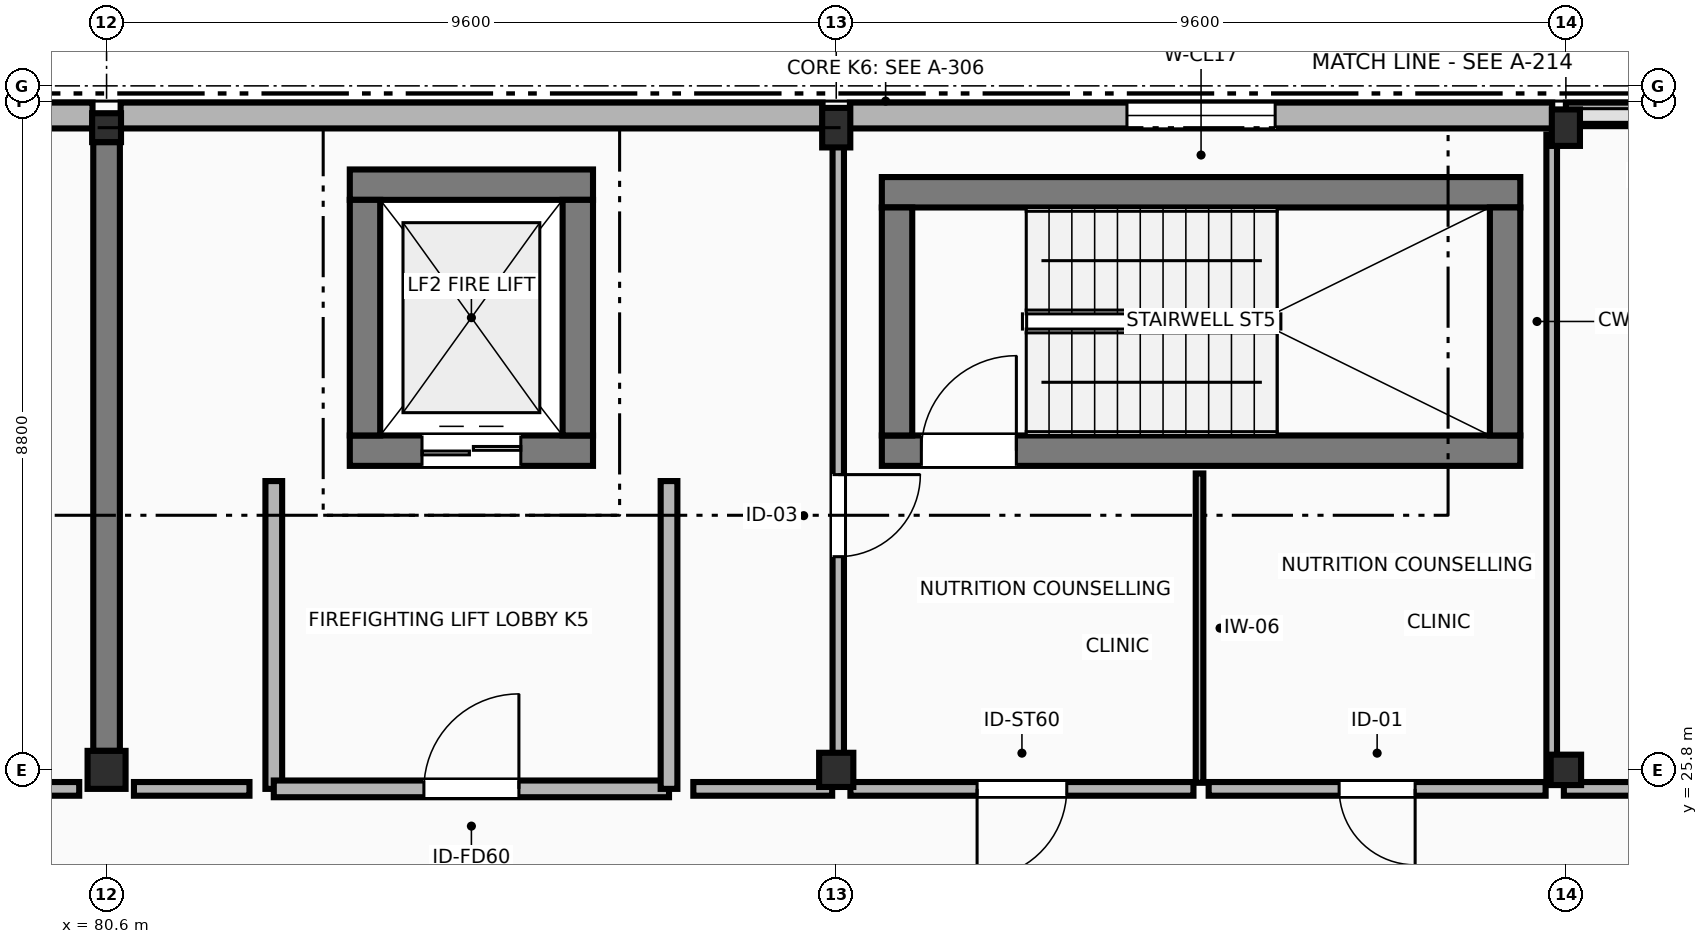
"""IFC4 building model, lengths in metres.
Left out: names, types, materials, properties, quantities, classifications, styles, units other than length and angle.
Written with IfcOpenShell. Run it as: python <this file> out.ifc"""

import sys

from ifc_helpers import new_model, si_unit, direction, frame, frame_2d, origin, origin_2d, place, context, subcontext, project, spatial, polyline, rectangle, outline, extrude, element, fill, save


model = new_model("IFC4")
c1 = context("Model", 3, precision=1e-05, world=origin(), true_north=direction((0.0, 1.0)))
c2 = subcontext(c1, "Body", "Model", "MODEL_VIEW")
j1 = project(units=[si_unit("LENGTHUNIT", "METRE"), si_unit("PLANEANGLEUNIT", "RADIAN")], contexts=[c1])
p1 = place(None, origin())
s1 = spatial("IfcSite", under=j1, at=p1, CompositionType="ELEMENT")
p2 = place(p1, origin())
s2 = spatial("IfcBuilding", under=s1, at=p2, CompositionType="ELEMENT")
p3 = place(p2, frame((0.0, 0.0, 18.0)))
s3 = spatial("IfcBuildingStorey", under=s2, at=p3, CompositionType="ELEMENT", Elevation=18.0)
p4 = place(p3, frame((80.6, 25.8, 0.0), z_axis=(0.0, 0.0, 1.0), x_axis=(1.0, 0.0, 0.0)))
e1 = element("IfcColumn", 1, at=p4, inside=s3, PredefinedType="COLUMN", context=c2, shape_type="SweptSolid", body=[
    extrude(rectangle(XDim=0.5, YDim=0.5, at=origin_2d()), origin(), (0.0, 0.0, 1.0), 4.2),
])
p5 = place(p3, frame((80.6, 34.25, 0.0), z_axis=(0.0, 0.0, 1.0), x_axis=(1.0, 0.0, 0.0)))
e2 = element("IfcColumn", 2, at=p5, inside=s3, PredefinedType="COLUMN", context=c2, shape_type="SweptSolid", body=[
    extrude(rectangle(XDim=0.38, YDim=0.38, at=origin_2d()), origin(), (0.0, 0.0, 1.0), 4.2),
])
p6 = place(p3, frame((90.2, 25.8, 0.0), z_axis=(0.0, 0.0, 1.0), x_axis=(1.0, 0.0, 0.0)))
e3 = element("IfcColumn", 3, at=p6, inside=s3, PredefinedType="COLUMN", context=c2, shape_type="SweptSolid", body=[
    extrude(rectangle(XDim=0.45, YDim=0.45, at=origin_2d()), origin(), (0.0, 0.0, 1.0), 4.2),
])
p7 = place(p3, frame((90.2, 34.25, 0.0), z_axis=(0.0, 0.0, 1.0), x_axis=(1.0, 0.0, 0.0)))
e4 = element("IfcColumn", 4, at=p7, inside=s3, PredefinedType="COLUMN", context=c2, shape_type="SweptSolid", body=[
    extrude(rectangle(XDim=0.37, YDim=0.52, at=origin_2d()), origin(), (0.0, 0.0, 1.0), 4.2),
])
p8 = place(p3, frame((99.8, 25.8, 0.0), z_axis=(0.0, 0.0, 1.0), x_axis=(1.0, 0.0, 0.0)))
e5 = element("IfcColumn", 5, at=p8, inside=s3, PredefinedType="COLUMN", context=c2, shape_type="SweptSolid", body=[
    extrude(rectangle(XDim=0.4, YDim=0.4, at=origin_2d()), origin(), (0.0, 0.0, 1.0), 4.2),
])
p9 = place(p3, frame((99.8, 34.25, 0.0), z_axis=(0.0, 0.0, 1.0), x_axis=(1.0, 0.0, 0.0)))
e6 = element("IfcColumn", 6, at=p9, inside=s3, PredefinedType="COLUMN", context=c2, shape_type="SweptSolid", body=[
    extrude(rectangle(XDim=0.37, YDim=0.48, at=origin_2d()), origin(), (0.0, 0.0, 1.0), 4.2),
])
p10 = place(p3, frame((99.62, 34.41, 0.0), z_axis=(0.0, 0.0, 1.0), x_axis=(-1.0, 0.0, 0.0)))
e7 = element("IfcWall", 7, at=p10, inside=s3, PredefinedType="STANDARD", context=c2, shape_type="SweptSolid", body=[
    extrude(rectangle(XDim=9.24, YDim=0.34, at=frame_2d((4.62, 0.0))), origin(), (0.0, 0.0, 1.0), 3.205),
])
p11 = place(p10, frame((3.645, 0.0, 0.95)))
e8 = element("IfcOpeningElement", 8, at=p11, cuts=e7, PredefinedType="OPENING", context=c2, shape_type="SweptSolid", body=[
    extrude(rectangle(XDim=1.95, YDim=1.55, at=frame_2d((0.975, 0.775))), frame((0.0, 0.18, 0.0), z_axis=(0.0, -1.0, 0.0), x_axis=(1.0, 0.0, 0.0)), (0.0, 0.0, 1.0), 0.36),
])
p12 = place(p3, frame((90.02, 34.41, 0.0), z_axis=(0.0, 0.0, 1.0), x_axis=(-1.0, 0.0, 0.0)))
e9 = element("IfcWall", 9, at=p12, inside=s3, PredefinedType="STANDARD", context=c2, shape_type="SweptSolid", body=[
    extrude(rectangle(XDim=9.235, YDim=0.34, at=frame_2d((4.618, 0.0))), origin(), (0.0, 0.0, 1.0), 3.205),
])
p13 = place(p3, frame((80.415, 34.41, 0.0), z_axis=(0.0, 0.0, 1.0), x_axis=(-1.0, 0.0, 0.0)))
e10 = element("IfcWall", 10, at=p13, inside=s3, PredefinedType="STANDARD", context=c2, shape_type="SweptSolid", body=[
    extrude(rectangle(XDim=9.205, YDim=0.34, at=frame_2d((4.603, 0.0))), origin(), (0.0, 0.0, 1.0), 3.205),
])
p14 = place(p3, frame((109.4, 34.425, 4.2), z_axis=(0.0, 0.0, 1.0), x_axis=(-1.0, 0.0, 0.0)))
e11 = element("IfcWall", 11, at=p14, inside=s3, PredefinedType="STANDARD", context=c2, shape_type="SweptSolid", body=[
    extrude(outline(polyline([(0.0, 0.0), (9.6, 0.0), (9.6, 0.0), (4.8, 8.19), (0.0, 0.0), (0.0, 0.0)])), frame((0.0, 0.155, 0.0), z_axis=(0.0, -1.0, 0.0), x_axis=(1.0, 0.0, 0.0)), (0.0, 0.0, 1.0), 0.31),
])
p15 = place(p14, frame((2.572, 0.0, 0.75)))
e12 = element("IfcOpeningElement", 12, at=p15, cuts=e11, PredefinedType="OPENING", context=c2, shape_type="SweptSolid", body=[
    extrude(rectangle(XDim=1.0, YDim=1.0, at=frame_2d((0.5, 0.5))), frame((0.0, 0.165, 0.0), z_axis=(0.0, -1.0, 0.0), x_axis=(1.0, 0.0, 0.0)), (0.0, 0.0, 1.0), 0.33),
])
p16 = place(p14, frame((5.836, 0.0, 1.55)))
e13 = element("IfcOpeningElement", 13, at=p16, cuts=e11, PredefinedType="OPENING", context=c2, shape_type="SweptSolid", body=[
    extrude(rectangle(XDim=1.0, YDim=1.0, at=frame_2d((0.5, 0.5))), frame((0.0, 0.165, 0.0), z_axis=(0.0, -1.0, 0.0), x_axis=(1.0, 0.0, 0.0)), (0.0, 0.0, 1.0), 0.33),
])
p17 = place(p14, frame((4.3, 0.0, 3.35)))
e14 = element("IfcOpeningElement", 14, at=p17, cuts=e11, PredefinedType="OPENING", context=c2, shape_type="SweptSolid", body=[
    extrude(rectangle(XDim=1.0, YDim=1.0, at=frame_2d((0.5, 0.5))), frame((0.0, 0.165, 0.0), z_axis=(0.0, -1.0, 0.0), x_axis=(1.0, 0.0, 0.0)), (0.0, 0.0, 1.0), 0.33),
])
p18 = place(p3, frame((90.8, 30.0, 0.0), z_axis=(0.0, 0.0, 1.0), x_axis=(1.0, 0.0, 0.0)))
e15 = element("IfcWall", 15, at=p18, inside=s3, PredefinedType="SHEAR", context=c2, shape_type="SweptSolid", body=[
    extrude(rectangle(XDim=8.4, YDim=0.4, at=frame_2d((4.2, 0.0))), origin(), (0.0, 0.0, 1.0), 3.94),
])
p19 = place(p18, frame((0.52, 0.0, 0.0)))
e16 = element("IfcOpeningElement", 16, at=p19, cuts=e15, PredefinedType="OPENING", context=c2, shape_type="SweptSolid", body=[
    extrude(rectangle(XDim=1.25, YDim=2.2, at=frame_2d((0.625, 1.1))), frame((0.0, 0.21, 0.0), z_axis=(0.0, -1.0, 0.0), x_axis=(1.0, 0.0, 0.0)), (0.0, 0.0, 1.0), 0.42),
])
p20 = place(p3, frame((99.2, 33.4, 0.0), z_axis=(0.0, 0.0, 1.0), x_axis=(-1.0, 0.0, 0.0)))
e17 = element("IfcWall", 17, at=p20, inside=s3, PredefinedType="SHEAR", context=c2, shape_type="SweptSolid", body=[
    extrude(rectangle(XDim=8.4, YDim=0.4, at=frame_2d((4.2, 0.0))), origin(), (0.0, 0.0, 1.0), 3.94),
])
for number, where, z_axis, x_axis in (
    (18, (91.0, 30.2, 0.0), (0.0, 0.0, 1.0), (0.0, 1.0, 0.0)),
    (19, (99.0, 33.2, 0.0), (0.0, 0.0, 1.0), (0.0, -1.0, 0.0)),
):
    element("IfcWall", number, at=place(p3, frame(where, z_axis=z_axis, x_axis=x_axis)), inside=s3, PredefinedType="SHEAR", context=c2, shape_type="SweptSolid", body=[
        extrude(rectangle(XDim=3.0, YDim=0.4, at=frame_2d((1.5, 0.0))), origin(), (0.0, 0.0, 1.0), 3.94),
    ])
p21 = place(p3, frame((83.8, 30.0, 0.0), z_axis=(0.0, 0.0, 1.0), x_axis=(1.0, 0.0, 0.0)))
e20 = element("IfcWall", 20, at=p21, inside=s3, PredefinedType="SHEAR", context=c2, shape_type="SweptSolid", body=[
    extrude(rectangle(XDim=3.2, YDim=0.4, at=frame_2d((1.6, 0.0))), origin(), (0.0, 0.0, 1.0), 4.2),
])
p22 = place(p21, frame((0.95, 0.0, 0.0)))
e21 = element("IfcOpeningElement", 21, at=p22, cuts=e20, PredefinedType="OPENING", context=c2, shape_type="SweptSolid", body=[
    extrude(rectangle(XDim=1.3, YDim=2.25, at=frame_2d((0.65, 1.125))), frame((0.0, 0.21, 0.0), z_axis=(0.0, -1.0, 0.0), x_axis=(1.0, 0.0, 0.0)), (0.0, 0.0, 1.0), 0.42),
])
p23 = place(p3, frame((87.0, 33.5, 0.0), z_axis=(0.0, 0.0, 1.0), x_axis=(-1.0, 0.0, 0.0)))
e22 = element("IfcWall", 22, at=p23, inside=s3, PredefinedType="SHEAR", context=c2, shape_type="SweptSolid", body=[
    extrude(rectangle(XDim=3.2, YDim=0.4, at=frame_2d((1.6, 0.0))), origin(), (0.0, 0.0, 1.0), 4.2),
])
for number, where, z_axis, x_axis in (
    (23, (84.0, 30.2, 0.0), (0.0, 0.0, 1.0), (0.0, 1.0, 0.0)),
    (24, (86.8, 33.3, 0.0), (0.0, 0.0, 1.0), (0.0, -1.0, 0.0)),
):
    element("IfcWall", number, at=place(p3, frame(where, z_axis=z_axis, x_axis=x_axis)), inside=s3, PredefinedType="SHEAR", context=c2, shape_type="SweptSolid", body=[
        extrude(rectangle(XDim=3.1, YDim=0.4, at=frame_2d((1.55, 0.0))), origin(), (0.0, 0.0, 1.0), 4.2),
    ])
p24 = place(p3, frame((82.8, 29.6, 0.0), z_axis=(0.0, 0.0, 1.0), x_axis=(0.0, -1.0, 0.0)))
e25 = element("IfcWall", 25, at=p24, inside=s3, PredefinedType="PARTITIONING", context=c2, shape_type="SweptSolid", body=[
    extrude(rectangle(XDim=4.05, YDim=0.22, at=frame_2d((2.025, 0.0))), origin(), (0.0, 0.0, 1.0), 3.94),
])
p25 = place(p3, frame((82.8, 25.55, 0.0), z_axis=(0.0, 0.0, 1.0), x_axis=(1.0, 0.0, 0.0)))
e26 = element("IfcWall", 26, at=p25, inside=s3, PredefinedType="PARTITIONING", context=c2, shape_type="SweptSolid", body=[
    extrude(rectangle(XDim=5.2, YDim=0.22, at=frame_2d((2.6, 0.0))), origin(), (0.0, 0.0, 1.0), 3.245),
])
p26 = place(p25, frame((1.975, 0.0, 0.0)))
e27 = element("IfcOpeningElement", 27, at=p26, cuts=e26, PredefinedType="OPENING", context=c2, shape_type="SweptSolid", body=[
    extrude(rectangle(XDim=1.25, YDim=2.2, at=frame_2d((0.625, 1.1))), frame((0.0, 0.12, 0.0), z_axis=(0.0, -1.0, 0.0), x_axis=(1.0, 0.0, 0.0)), (0.0, 0.0, 1.0), 0.24),
])
p27 = place(p3, frame((88.0, 25.55, 0.0), z_axis=(0.0, 0.0, 1.0), x_axis=(0.0, 1.0, 0.0)))
e28 = element("IfcWall", 28, at=p27, inside=s3, PredefinedType="PARTITIONING", context=c2, shape_type="SweptSolid", body=[
    extrude(rectangle(XDim=4.05, YDim=0.22, at=frame_2d((2.025, 0.0))), origin(), (0.0, 0.0, 1.0), 3.94),
])
p28 = place(p3, frame((80.6, 26.05, 0.0), z_axis=(0.0, 0.0, 1.0), x_axis=(0.0, 1.0, 0.0)))
e29 = element("IfcWall", 29, at=p28, inside=s3, PredefinedType="SHEAR", context=c2, shape_type="SweptSolid", body=[
    extrude(rectangle(XDim=8.01, YDim=0.35, at=frame_2d((4.005, 0.0))), origin(), (0.0, 0.0, 1.0), 3.94),
])
p29 = place(p3, frame((80.24, 25.55, 0.0), z_axis=(0.0, 0.0, 1.0), x_axis=(-1.0, 0.0, 0.0)))
e30 = element("IfcWall", 30, at=p29, inside=s3, PredefinedType="PARTITIONING", context=c2, shape_type="SweptSolid", body=[
    extrude(rectangle(XDim=2.12, YDim=0.18, at=frame_2d((1.06, 0.0))), origin(), (0.0, 0.0, 1.0), 3.245),
])
p30 = place(p29, frame((0.5, 0.0, 0.0)))
e31 = element("IfcOpeningElement", 31, at=p30, cuts=e30, PredefinedType="OPENING", context=c2, shape_type="SweptSolid", body=[
    extrude(rectangle(XDim=1.12, YDim=2.16, at=frame_2d((0.56, 1.08))), frame((0.0, 0.1, 0.0), z_axis=(0.0, -1.0, 0.0), x_axis=(1.0, 0.0, 0.0)), (0.0, 0.0, 1.0), 0.2),
])
p31 = place(p3, frame((82.48, 25.55, 0.0), z_axis=(0.0, 0.0, 1.0), x_axis=(-1.0, 0.0, 0.0)))
e32 = element("IfcWall", 32, at=p31, inside=s3, PredefinedType="PARTITIONING", context=c2, shape_type="SweptSolid", body=[
    extrude(rectangle(XDim=1.52, YDim=0.18, at=frame_2d((0.76, 0.0))), origin(), (0.0, 0.0, 1.0), 3.245),
])
p32 = place(p3, frame((90.227, 34.16, 0.0), z_axis=(0.0, 0.0, 1.0), x_axis=(0.0, -1.0, 0.0)))
e33 = element("IfcWall", 33, at=p32, inside=s3, PredefinedType="PARTITIONING", context=c2, shape_type="SweptSolid", body=[
    extrude(rectangle(XDim=8.53, YDim=0.15, at=frame_2d((4.265, 0.0))), origin(), (0.0, 0.0, 1.0), 3.425),
])
p33 = place(p32, frame((4.475, 0.0, 0.0)))
e34 = element("IfcOpeningElement", 34, at=p33, cuts=e33, PredefinedType="OPENING", context=c2, shape_type="SweptSolid", body=[
    extrude(rectangle(XDim=1.08, YDim=2.2, at=frame_2d((0.54, 1.1))), frame((0.0, 0.085, 0.0), z_axis=(0.0, -1.0, 0.0), x_axis=(1.0, 0.0, 0.0)), (0.0, 0.0, 1.0), 0.17),
])
p34 = place(p3, frame((90.147, 25.55, 0.0), z_axis=(0.0, 0.0, 1.0), x_axis=(-1.0, 0.0, 0.0)))
e35 = element("IfcWall", 35, at=p34, inside=s3, PredefinedType="PARTITIONING", context=c2, shape_type="SweptSolid", body=[
    extrude(rectangle(XDim=1.827, YDim=0.18, at=frame_2d((0.913, 0.0))), origin(), (0.0, 0.0, 1.0), 3.245),
])
p35 = place(p3, frame((94.98, 29.7, 0.0), z_axis=(0.0, 0.0, 1.0), x_axis=(0.0, -1.0, 0.0)))
e36 = element("IfcWall", 36, at=p35, inside=s3, PredefinedType="PARTITIONING", context=c2, shape_type="SweptSolid", body=[
    extrude(rectangle(XDim=4.07, YDim=0.1, at=frame_2d((2.035, 0.0))), origin(), (0.0, 0.0, 1.0), 3.94),
])
p36 = place(p3, frame((94.9, 25.55, 0.0), z_axis=(0.0, 0.0, 1.0), x_axis=(-1.0, 0.0, 0.0)))
e37 = element("IfcWall", 37, at=p36, inside=s3, PredefinedType="PARTITIONING", context=c2, shape_type="SweptSolid", body=[
    extrude(rectangle(XDim=4.513, YDim=0.18, at=frame_2d((2.257, 0.0))), origin(), (0.0, 0.0, 1.0), 3.245),
])
p37 = place(p36, frame((1.667, 0.0, 0.0)))
e38 = element("IfcOpeningElement", 38, at=p37, cuts=e37, PredefinedType="OPENING", context=c2, shape_type="SweptSolid", body=[
    extrude(rectangle(XDim=1.18, YDim=2.18, at=frame_2d((0.59, 1.09))), frame((0.0, 0.1, 0.0), z_axis=(0.0, -1.0, 0.0), x_axis=(1.0, 0.0, 0.0)), (0.0, 0.0, 1.0), 0.2),
])
p38 = place(p3, frame((99.613, 34.16, 0.0), z_axis=(0.0, 0.0, 1.0), x_axis=(0.0, -1.0, 0.0)))
e39 = element("IfcWall", 39, at=p38, inside=s3, PredefinedType="PARTITIONING", context=c2, shape_type="SweptSolid", body=[
    extrude(rectangle(XDim=8.53, YDim=0.14, at=frame_2d((4.265, 0.0))), origin(), (0.0, 0.0, 1.0), 2.985),
])
p39 = place(p3, frame((99.533, 25.55, 0.0), z_axis=(0.0, 0.0, 1.0), x_axis=(-1.0, 0.0, 0.0)))
e40 = element("IfcWall", 40, at=p39, inside=s3, PredefinedType="PARTITIONING", context=c2, shape_type="SweptSolid", body=[
    extrude(rectangle(XDim=4.433, YDim=0.18, at=frame_2d((2.217, 0.0))), origin(), (0.0, 0.0, 1.0), 3.245),
])
p40 = place(p39, frame((1.717, 0.0, 0.0)))
e41 = element("IfcOpeningElement", 41, at=p40, cuts=e40, PredefinedType="OPENING", context=c2, shape_type="SweptSolid", body=[
    extrude(rectangle(XDim=1.0, YDim=2.15, at=frame_2d((0.5, 1.075))), frame((0.0, 0.1, 0.0), z_axis=(0.0, -1.0, 0.0), x_axis=(1.0, 0.0, 0.0)), (0.0, 0.0, 1.0), 0.2),
])
p41 = place(p3, frame((108.96, 25.55, 0.0), z_axis=(0.0, 0.0, 1.0), x_axis=(-1.0, 0.0, 0.0)))
e42 = element("IfcWall", 42, at=p41, inside=s3, PredefinedType="PARTITIONING", context=c2, shape_type="SweptSolid", body=[
    extrude(rectangle(XDim=9.187, YDim=0.18, at=frame_2d((4.593, 0.0))), origin(), (0.0, 0.0, 1.0), 3.94),
])
p42 = place(p41, frame((4.073, 0.0, 0.0)))
e43 = element("IfcOpeningElement", 43, at=p42, cuts=e42, PredefinedType="OPENING", context=c2, shape_type="SweptSolid", body=[
    extrude(rectangle(XDim=1.04, YDim=2.15, at=frame_2d((0.52, 1.075))), frame((0.0, 0.1, 0.0), z_axis=(0.0, -1.0, 0.0), x_axis=(1.0, 0.0, 0.0)), (0.0, 0.0, 1.0), 0.2),
])
p43 = place(p11, origin())
e44 = element("IfcWindow", 44, at=p43, inside=s3, PartitioningType="SINGLE_PANEL", PredefinedType="WINDOW", context=c2, shape_type="SweptSolid", body=[
    extrude(rectangle(XDim=1.95, YDim=1.55, at=frame_2d((0.975, 0.775))), frame((0.0, 0.03, 0.0), z_axis=(0.0, -1.0, 0.0), x_axis=(1.0, 0.0, 0.0)), (0.0, 0.0, 1.0), 0.06),
])
fill(e8, e44)
p44 = place(p19, origin())
e45 = element("IfcDoor", 45, at=p44, inside=s3, OperationType="SINGLE_SWING_RIGHT", PredefinedType="DOOR", context=c2, shape_type="SweptSolid", body=[
    extrude(rectangle(XDim=1.25, YDim=2.2, at=frame_2d((0.625, 1.1))), frame((0.0, 0.025, 0.0), z_axis=(0.0, -1.0, 0.0), x_axis=(1.0, 0.0, 0.0)), (0.0, 0.0, 1.0), 0.05),
])
fill(e16, e45)
p45 = place(p22, origin())
e46 = element("IfcDoor", 46, at=p45, inside=s3, OperationType="DOUBLE_DOOR_SLIDING", PredefinedType="DOOR", context=c2, shape_type="SweptSolid", body=[
    extrude(rectangle(XDim=1.3, YDim=2.25, at=frame_2d((0.65, 1.125))), frame((0.0, 0.025, 0.0), z_axis=(0.0, -1.0, 0.0), x_axis=(1.0, 0.0, 0.0)), (0.0, 0.0, 1.0), 0.05),
])
fill(e21, e46)
p46 = place(p26, origin())
e47 = element("IfcDoor", 47, at=p46, inside=s3, OperationType="SINGLE_SWING_RIGHT", PredefinedType="DOOR", context=c2, shape_type="SweptSolid", body=[
    extrude(rectangle(XDim=1.25, YDim=2.2, at=frame_2d((0.625, 1.1))), frame((0.0, 0.025, 0.0), z_axis=(0.0, -1.0, 0.0), x_axis=(1.0, 0.0, 0.0)), (0.0, 0.0, 1.0), 0.05),
])
fill(e27, e47)
p47 = place(p33, origin())
e48 = element("IfcDoor", 48, at=p47, inside=s3, OperationType="SINGLE_SWING_LEFT", PredefinedType="DOOR", context=c2, shape_type="SweptSolid", body=[
    extrude(rectangle(XDim=1.08, YDim=2.2, at=frame_2d((0.54, 1.1))), frame((0.0, 0.025, 0.0), z_axis=(0.0, -1.0, 0.0), x_axis=(1.0, 0.0, 0.0)), (0.0, 0.0, 1.0), 0.05),
])
fill(e34, e48)
p48 = place(p37, origin())
e49 = element("IfcDoor", 49, at=p48, inside=s3, OperationType="SINGLE_SWING_RIGHT", PredefinedType="DOOR", context=c2, shape_type="SweptSolid", body=[
    extrude(rectangle(XDim=1.18, YDim=2.18, at=frame_2d((0.59, 1.09))), frame((0.0, 0.025, 0.0), z_axis=(0.0, -1.0, 0.0), x_axis=(1.0, 0.0, 0.0)), (0.0, 0.0, 1.0), 0.05),
])
fill(e38, e49)
p49 = place(p40, origin())
e50 = element("IfcDoor", 50, at=p49, inside=s3, OperationType="SINGLE_SWING_LEFT", PredefinedType="DOOR", context=c2, shape_type="SweptSolid", body=[
    extrude(rectangle(XDim=1.0, YDim=2.15, at=frame_2d((0.5, 1.075))), frame((0.0, 0.025, 0.0), z_axis=(0.0, -1.0, 0.0), x_axis=(1.0, 0.0, 0.0)), (0.0, 0.0, 1.0), 0.05),
])
fill(e41, e50)
save(model, sys.argv[1])
